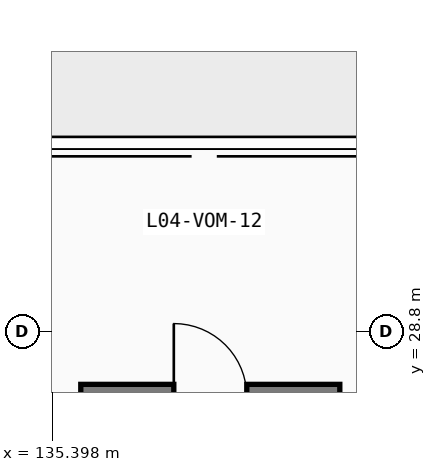
"""IFC4 building model, lengths in metres.
Left out: names, types, materials, properties, quantities, classifications, styles, units other than length and angle.
Written with IfcOpenShell. Run it as: python <this file> out.ifc"""

import sys

from ifc_helpers import new_model, si_unit, direction, frame, frame_2d, origin, place, context, subcontext, project, spatial, rectangle, extrude, element, save


model = new_model("IFC4")
c1 = context("Model", 3, precision=1e-05, world=origin(), true_north=direction((0.0, 1.0)))
c2 = subcontext(c1, "Body", "Model", "MODEL_VIEW")
j1 = project(units=[si_unit("LENGTHUNIT", "METRE"), si_unit("PLANEANGLEUNIT", "RADIAN")], contexts=[c1])
p1 = place(None, origin())
s1 = spatial("IfcSite", under=j1, at=p1, CompositionType="ELEMENT")
p2 = place(p1, origin())
s2 = spatial("IfcBuilding", under=s1, at=p2, CompositionType="ELEMENT")
p3 = place(p2, frame((0.0, 0.0, 18.6)))
s3 = spatial("IfcBuildingStorey", under=s2, at=p3, CompositionType="ELEMENT", Elevation=18.6)
p4 = place(p3, frame((140.13, 27.73, 0.0), z_axis=(0.0, 0.0, 1.0), x_axis=(-1.0, 0.0, 0.0)))
e1 = element("IfcWall", 1, at=p4, inside=s3, PredefinedType="SHEAR", context=c2, shape_type="SweptSolid", body=[
    extrude(rectangle(XDim=4.26, YDim=0.4, at=frame_2d((2.13, 0.0))), origin(), (0.0, 0.0, 1.0), 4.24),
])
p5 = place(p4, frame((2.73, 0.0, 0.0), z_axis=(0.0, 0.0, 1.0), x_axis=(-1.0, 0.0, 0.0)))
e2 = element("IfcOpeningElement", 2, at=p5, cuts=e1, PredefinedType="OPENING", context=c2, shape_type="SweptSolid", body=[
    extrude(rectangle(XDim=1.2, YDim=2.2, at=frame_2d((0.6, 1.1))), frame((0.0, 0.21, 0.0), z_axis=(0.0, -1.0, 0.0), x_axis=(1.0, 0.0, 0.0)), (0.0, 0.0, 1.0), 0.42),
])
save(model, sys.argv[1])
